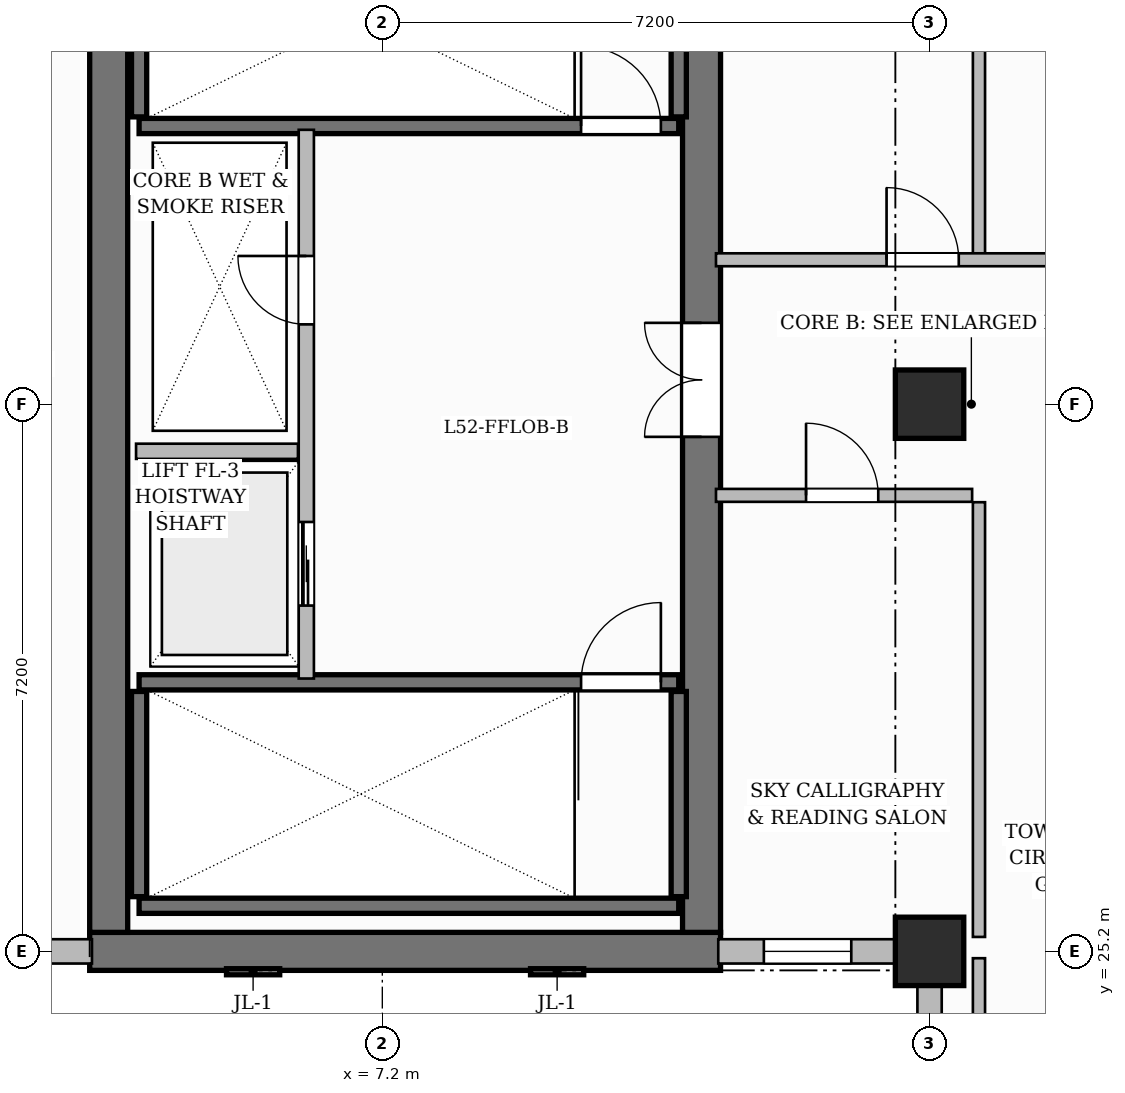
"""IFC4 building model, lengths in metres.
Left out: names, types, materials, properties, quantities, classifications, styles, units other than length and angle.
Written with IfcOpenShell. Run it as: python <this file> out.ifc"""

import sys

from ifc_helpers import new_model, si_unit, direction, frame, frame_2d, origin, origin_2d, place, context, subcontext, project, spatial, rectangle, extrude, source, transform, mapped, element, fill, save


model = new_model("IFC4")
c1 = context("Model", 3, precision=1e-05, world=origin(), true_north=direction((0.0, 1.0)))
c2 = subcontext(c1, "Body", "Model", "MODEL_VIEW")
j1 = project(units=[si_unit("LENGTHUNIT", "METRE"), si_unit("PLANEANGLEUNIT", "RADIAN")], contexts=[c1])
p1 = place(None, origin())
s1 = spatial("IfcSite", under=j1, at=p1, CompositionType="ELEMENT")
p2 = place(p1, origin())
s2 = spatial("IfcBuilding", under=s1, at=p2, CompositionType="ELEMENT")
p3 = place(p2, frame((0.0, 0.0, 209.6)))
s3 = spatial("IfcBuildingStorey", under=s2, at=p3, CompositionType="ELEMENT", Elevation=209.6)
p4 = place(p3, frame((3.35, 25.2, 0.0), z_axis=(0.0, 0.0, 1.0), x_axis=(1.0, 0.0, 0.0)))
e1 = element("IfcWall", 1, at=p4, inside=s3, PredefinedType="SHEAR", context=c2, shape_type="SweptSolid", body=[
    extrude(rectangle(XDim=8.3, YDim=0.5, at=frame_2d((4.15, 0.0))), origin(), (0.0, 0.0, 1.0), 3.85),
])
p5 = place(p3, frame((3.6, 25.45, 0.0), z_axis=(0.0, 0.0, 1.0), x_axis=(0.0, 1.0, 0.0)))
e2 = element("IfcWall", 2, at=p5, inside=s3, PredefinedType="SHEAR", context=c2, shape_type="SweptSolid", body=[
    extrude(rectangle(XDim=13.9, YDim=0.5, at=frame_2d((6.95, 0.0))), origin(), (0.0, 0.0, 1.0), 3.85),
])
p6 = place(p3, frame((11.4, 25.45, 0.0), z_axis=(0.0, 0.0, 1.0), x_axis=(0.0, 1.0, 0.0)))
e3 = element("IfcWall", 3, at=p6, inside=s3, PredefinedType="SHEAR", context=c2, shape_type="SweptSolid", body=[
    extrude(rectangle(XDim=13.9, YDim=0.5, at=frame_2d((6.95, 0.0))), origin(), (0.0, 0.0, 1.0), 3.85),
])
p7 = place(p6, frame((6.52, 0.0, 0.0)))
e4 = element("IfcOpeningElement", 4, at=p7, cuts=e3, PredefinedType="OPENING", context=c2, shape_type="SweptSolid", body=[
    extrude(rectangle(XDim=1.5, YDim=2.2, at=frame_2d((0.75, 1.1))), frame((0.0, 0.26, 0.0), z_axis=(0.0, -1.0, 0.0), x_axis=(1.0, 0.0, 0.0)), (0.0, 0.0, 1.0), 0.52),
])
m1 = source(origin(), c2, "Body", "SweptSolid", [
    extrude(rectangle(XDim=0.9, YDim=0.9, at=origin_2d()), origin(), (0.0, 0.0, 1.0), 3.85),
])
for number, where, z_axis, x_axis in (
    (5, (14.4, 25.2, 0.0), (0.0, 0.0, 1.0), (1.0, 0.0, 0.0)),
    (6, (14.4, 32.4, 0.0), (0.0, 0.0, 1.0), (1.0, 0.0, 0.0)),
):
    element("IfcColumn", number, at=place(p3, frame(where, z_axis=z_axis, x_axis=x_axis)), inside=s3, PredefinedType="COLUMN", context=c2, shape_type="MappedRepresentation", body=[
        mapped(m1, transform((0.0, 0.0, 0.0), scale=1.0)),
    ])
p8 = place(p3, frame((4.0, 25.8, 0.0), z_axis=(0.0, 0.0, 1.0), x_axis=(1.0, 0.0, 0.0)))
e7 = element("IfcWall", 7, at=p8, inside=s3, PredefinedType="SHEAR", context=c2, shape_type="SweptSolid", body=[
    extrude(rectangle(XDim=7.1, YDim=0.2, at=frame_2d((3.55, 0.0))), origin(), (0.0, 0.0, 1.0), 3.85),
])
for number, where, z_axis, x_axis in (
    (8, (4.0, 25.92, 0.0), (0.0, 0.0, 1.0), (0.0, 1.0, 0.0)),
    (9, (11.1, 25.92, 0.0), (0.0, 0.0, 1.0), (0.0, 1.0, 0.0)),
):
    element("IfcWall", number, at=place(p3, frame(where, z_axis=z_axis, x_axis=x_axis)), inside=s3, PredefinedType="SHEAR", context=c2, shape_type="SweptSolid", body=[
        extrude(rectangle(XDim=2.7, YDim=0.2, at=frame_2d((1.35, 0.0))), origin(), (0.0, 0.0, 1.0), 3.85),
    ])
p9 = place(p3, frame((4.0, 28.74, 0.0), z_axis=(0.0, 0.0, 1.0), x_axis=(1.0, 0.0, 0.0)))
e10 = element("IfcWall", 10, at=p9, inside=s3, PredefinedType="SHEAR", context=c2, shape_type="SweptSolid", body=[
    extrude(rectangle(XDim=7.1, YDim=0.2, at=frame_2d((3.55, 0.0))), origin(), (0.0, 0.0, 1.0), 3.85),
])
p10 = place(p9, frame((5.815, 0.0, 0.0)))
e11 = element("IfcOpeningElement", 11, at=p10, cuts=e10, PredefinedType="OPENING", context=c2, shape_type="SweptSolid", body=[
    extrude(rectangle(XDim=1.05, YDim=2.2, at=frame_2d((0.525, 1.1))), frame((0.0, 0.11, 0.0), z_axis=(0.0, -1.0, 0.0), x_axis=(1.0, 0.0, 0.0)), (0.0, 0.0, 1.0), 0.22),
])
for number, where, z_axis, x_axis in (
    (12, (4.0, 36.18, 0.0), (0.0, 0.0, 1.0), (0.0, 1.0, 0.0)),
    (13, (11.1, 36.18, 0.0), (0.0, 0.0, 1.0), (0.0, 1.0, 0.0)),
):
    element("IfcWall", number, at=place(p3, frame(where, z_axis=z_axis, x_axis=x_axis)), inside=s3, PredefinedType="SHEAR", context=c2, shape_type="SweptSolid", body=[
        extrude(rectangle(XDim=2.7, YDim=0.2, at=frame_2d((1.35, 0.0))), origin(), (0.0, 0.0, 1.0), 3.85),
    ])
p11 = place(p3, frame((4.0, 36.06, 0.0), z_axis=(0.0, 0.0, 1.0), x_axis=(1.0, 0.0, 0.0)))
e14 = element("IfcWall", 14, at=p11, inside=s3, PredefinedType="SHEAR", context=c2, shape_type="SweptSolid", body=[
    extrude(rectangle(XDim=7.1, YDim=0.2, at=frame_2d((3.55, 0.0))), origin(), (0.0, 0.0, 1.0), 3.85),
])
p12 = place(p11, frame((5.815, 0.0, 0.0)))
e15 = element("IfcOpeningElement", 15, at=p12, cuts=e14, PredefinedType="OPENING", context=c2, shape_type="SweptSolid", body=[
    extrude(rectangle(XDim=1.05, YDim=2.2, at=frame_2d((0.525, 1.1))), frame((0.0, 0.11, 0.0), z_axis=(0.0, -1.0, 0.0), x_axis=(1.0, 0.0, 0.0)), (0.0, 0.0, 1.0), 0.22),
])
p13 = place(p3, frame((6.2, 28.79, 0.0), z_axis=(0.0, 0.0, 1.0), x_axis=(0.0, 1.0, 0.0)))
e16 = element("IfcWall", 16, at=p13, inside=s3, PredefinedType="PARTITIONING", context=c2, shape_type="SweptSolid", body=[
    extrude(rectangle(XDim=7.22, YDim=0.2, at=frame_2d((3.61, 0.0))), origin(), (0.0, 0.0, 1.0), 3.6),
])
p14 = place(p13, frame((4.66, 0.0, 0.0)))
e17 = element("IfcOpeningElement", 17, at=p14, cuts=e16, PredefinedType="OPENING", context=c2, shape_type="SweptSolid", body=[
    extrude(rectangle(XDim=0.9, YDim=2.1, at=frame_2d((0.45, 1.05))), frame((0.0, 0.11, 0.0), z_axis=(0.0, -1.0, 0.0), x_axis=(1.0, 0.0, 0.0)), (0.0, 0.0, 1.0), 0.22),
])
p15 = place(p13, frame((0.96, 0.0, 0.0)))
e18 = element("IfcOpeningElement", 18, at=p15, cuts=e16, PredefinedType="OPENING", context=c2, shape_type="SweptSolid", body=[
    extrude(rectangle(XDim=1.1, YDim=2.2, at=frame_2d((0.55, 1.1))), frame((0.0, 0.11, 0.0), z_axis=(0.0, -1.0, 0.0), x_axis=(1.0, 0.0, 0.0)), (0.0, 0.0, 1.0), 0.22),
])
p16 = place(p3, frame((3.96, 31.78, 0.0), z_axis=(0.0, 0.0, 1.0), x_axis=(1.0, 0.0, 0.0)))
e19 = element("IfcWall", 19, at=p16, inside=s3, PredefinedType="PARTITIONING", context=c2, shape_type="SweptSolid", body=[
    extrude(rectangle(XDim=2.13, YDim=0.2, at=frame_2d((1.065, 0.0))), origin(), (0.0, 0.0, 1.0), 3.6),
])
p17 = place(p3, frame((15.05, 11.96, 0.0), z_axis=(0.0, 0.0, 1.0), x_axis=(0.0, 1.0, 0.0)))
e20 = element("IfcWall", 20, at=p17, inside=s3, PredefinedType="PARTITIONING", context=c2, shape_type="SweptSolid", body=[
    extrude(rectangle(XDim=13.15, YDim=0.16, at=frame_2d((6.575, 0.0))), origin(), (0.0, 0.0, 1.0), 3.6),
])
p18 = place(p3, frame((15.05, 34.34, 0.0), z_axis=(0.0, 0.0, 1.0), x_axis=(0.0, 1.0, 0.0)))
e21 = element("IfcWall", 21, at=p18, inside=s3, PredefinedType="PARTITIONING", context=c2, shape_type="SweptSolid", body=[
    extrude(rectangle(XDim=5.22, YDim=0.16, at=frame_2d((2.61, 0.0))), origin(), (0.0, 0.0, 1.0), 3.6),
])
p19 = place(p3, frame((15.05, 25.39, 0.0), z_axis=(0.0, 0.0, 1.0), x_axis=(0.0, 1.0, 0.0)))
e22 = element("IfcWall", 22, at=p19, inside=s3, PredefinedType="PARTITIONING", context=c2, shape_type="SweptSolid", body=[
    extrude(rectangle(XDim=5.72, YDim=0.16, at=frame_2d((2.86, 0.0))), origin(), (0.0, 0.0, 1.0), 3.6),
])
p20 = place(p3, frame((11.59, 31.2, 0.0), z_axis=(0.0, 0.0, 1.0), x_axis=(1.0, 0.0, 0.0)))
e23 = element("IfcWall", 23, at=p20, inside=s3, PredefinedType="PARTITIONING", context=c2, shape_type="SweptSolid", body=[
    extrude(rectangle(XDim=3.37, YDim=0.17, at=frame_2d((1.685, 0.0))), origin(), (0.0, 0.0, 1.0), 3.6),
])
p21 = place(p20, frame((1.185, 0.0, 0.0)))
e24 = element("IfcOpeningElement", 24, at=p21, cuts=e23, PredefinedType="OPENING", context=c2, shape_type="SweptSolid", body=[
    extrude(rectangle(XDim=0.95, YDim=2.15, at=frame_2d((0.475, 1.075))), frame((0.0, 0.095, 0.0), z_axis=(0.0, -1.0, 0.0), x_axis=(1.0, 0.0, 0.0)), (0.0, 0.0, 1.0), 0.19),
])
p22 = place(p3, frame((11.59, 34.3, 0.0), z_axis=(0.0, 0.0, 1.0), x_axis=(1.0, 0.0, 0.0)))
e25 = element("IfcWall", 25, at=p22, inside=s3, PredefinedType="PARTITIONING", context=c2, shape_type="SweptSolid", body=[
    extrude(rectangle(XDim=6.242, YDim=0.17, at=frame_2d((3.121, 0.0))), origin(), (0.0, 0.0, 1.0), 3.6),
])
p23 = place(p22, frame((2.244, 0.0, 0.0)))
e26 = element("IfcOpeningElement", 26, at=p23, cuts=e25, PredefinedType="OPENING", context=c2, shape_type="SweptSolid", body=[
    extrude(rectangle(XDim=0.95, YDim=2.15, at=frame_2d((0.475, 1.075))), frame((0.0, 0.095, 0.0), z_axis=(0.0, -1.0, 0.0), x_axis=(1.0, 0.0, 0.0)), (0.0, 0.0, 1.0), 0.19),
])
p24 = place(p3, frame((14.4, 0.05, 0.0), z_axis=(0.0, 0.0, 1.0), x_axis=(0.0, 1.0, 0.0)))
e27 = element("IfcWall", 27, at=p24, inside=s3, PredefinedType="SOLIDWALL", context=c2, shape_type="SweptSolid", body=[
    extrude(rectangle(XDim=25.1, YDim=0.32, at=frame_2d((12.55, 0.0))), origin(), (0.0, 0.0, 1.0), 3.085),
])
p25 = place(p24, frame((3.4, 0.0, 0.0)))
e28 = element("IfcOpeningElement", 28, at=p25, cuts=e27, PredefinedType="OPENING", context=c2, shape_type="SweptSolid", body=[
    extrude(rectangle(XDim=1.2, YDim=2.2, at=frame_2d((0.6, 1.1))), frame((0.0, 0.17, 0.0), z_axis=(0.0, -1.0, 0.0), x_axis=(1.0, 0.0, 0.0)), (0.0, 0.0, 1.0), 0.34),
])
p26 = place(p24, frame((1.225, 0.0, 0.8)))
e29 = element("IfcOpeningElement", 29, at=p26, cuts=e27, PredefinedType="OPENING", context=c2, shape_type="SweptSolid", body=[
    extrude(rectangle(XDim=1.4, YDim=1.85, at=frame_2d((0.7, 0.925))), frame((0.0, 0.17, 0.0), z_axis=(0.0, -1.0, 0.0), x_axis=(1.0, 0.0, 0.0)), (0.0, 0.0, 1.0), 0.34),
])
p27 = place(p24, frame((5.154, 0.0, 0.8)))
e30 = element("IfcOpeningElement", 30, at=p27, cuts=e27, PredefinedType="OPENING", context=c2, shape_type="SweptSolid", body=[
    extrude(rectangle(XDim=0.95, YDim=1.75, at=frame_2d((0.475, 0.875))), frame((0.0, 0.17, 0.0), z_axis=(0.0, -1.0, 0.0), x_axis=(1.0, 0.0, 0.0)), (0.0, 0.0, 1.0), 0.34),
])
p28 = place(p24, frame((8.346, 0.0, 0.8)))
e31 = element("IfcOpeningElement", 31, at=p28, cuts=e27, PredefinedType="OPENING", context=c2, shape_type="SweptSolid", body=[
    extrude(rectangle(XDim=1.15, YDim=1.8, at=frame_2d((0.575, 0.9))), frame((0.0, 0.17, 0.0), z_axis=(0.0, -1.0, 0.0), x_axis=(1.0, 0.0, 0.0)), (0.0, 0.0, 1.0), 0.34),
])
p29 = place(p24, frame((10.285, 0.0, 0.8)))
e32 = element("IfcOpeningElement", 32, at=p29, cuts=e27, PredefinedType="OPENING", context=c2, shape_type="SweptSolid", body=[
    extrude(rectangle(XDim=1.15, YDim=1.8, at=frame_2d((0.575, 0.9))), frame((0.0, 0.17, 0.0), z_axis=(0.0, -1.0, 0.0), x_axis=(1.0, 0.0, 0.0)), (0.0, 0.0, 1.0), 0.34),
])
p30 = place(p24, frame((12.114, 0.0, 0.8)))
e33 = element("IfcOpeningElement", 33, at=p30, cuts=e27, PredefinedType="OPENING", context=c2, shape_type="SweptSolid", body=[
    extrude(rectangle(XDim=1.15, YDim=1.8, at=frame_2d((0.575, 0.9))), frame((0.0, 0.17, 0.0), z_axis=(0.0, -1.0, 0.0), x_axis=(1.0, 0.0, 0.0)), (0.0, 0.0, 1.0), 0.34),
])
p31 = place(p24, frame((15.675, 0.0, 0.8)))
e34 = element("IfcOpeningElement", 34, at=p31, cuts=e27, PredefinedType="OPENING", context=c2, shape_type="SweptSolid", body=[
    extrude(rectangle(XDim=1.8, YDim=1.85, at=frame_2d((0.9, 0.925))), frame((0.0, 0.17, 0.0), z_axis=(0.0, -1.0, 0.0), x_axis=(1.0, 0.0, 0.0)), (0.0, 0.0, 1.0), 0.34),
])
p32 = place(p24, frame((18.425, 0.0, 0.8)))
e35 = element("IfcOpeningElement", 35, at=p32, cuts=e27, PredefinedType="OPENING", context=c2, shape_type="SweptSolid", body=[
    extrude(rectangle(XDim=1.8, YDim=1.85, at=frame_2d((0.9, 0.925))), frame((0.0, 0.17, 0.0), z_axis=(0.0, -1.0, 0.0), x_axis=(1.0, 0.0, 0.0)), (0.0, 0.0, 1.0), 0.34),
])
p33 = place(p24, frame((22.65, 0.0, 0.8)))
e36 = element("IfcOpeningElement", 36, at=p33, cuts=e27, PredefinedType="OPENING", context=c2, shape_type="SweptSolid", body=[
    extrude(rectangle(XDim=1.4, YDim=1.85, at=frame_2d((0.7, 0.925))), frame((0.0, 0.17, 0.0), z_axis=(0.0, -1.0, 0.0), x_axis=(1.0, 0.0, 0.0)), (0.0, 0.0, 1.0), 0.34),
])
p34 = place(p3, frame((11.62, 25.2, 0.0), z_axis=(0.0, 0.0, 1.0), x_axis=(1.0, 0.0, 0.0)))
e37 = element("IfcWall", 37, at=p34, inside=s3, PredefinedType="SOLIDWALL", context=c2, shape_type="SweptSolid", body=[
    extrude(rectangle(XDim=2.78, YDim=0.32, at=frame_2d((1.39, 0.0))), origin(), (0.0, 0.0, 1.0), 2.835),
])
p35 = place(p34, frame((0.6, 0.0, 0.8)))
e38 = element("IfcOpeningElement", 38, at=p35, cuts=e37, PredefinedType="OPENING", context=c2, shape_type="SweptSolid", body=[
    extrude(rectangle(XDim=1.15, YDim=1.8, at=frame_2d((0.575, 0.9))), frame((0.0, 0.17, 0.0), z_axis=(0.0, -1.0, 0.0), x_axis=(1.0, 0.0, 0.0)), (0.0, 0.0, 1.0), 0.34),
])
p36 = place(p3, frame((0.0, 25.2, 0.0), z_axis=(0.0, 0.0, 1.0), x_axis=(1.0, 0.0, 0.0)))
e39 = element("IfcWall", 39, at=p36, inside=s3, PredefinedType="SOLIDWALL", context=c2, shape_type="SweptSolid", body=[
    extrude(rectangle(XDim=3.38, YDim=0.32, at=frame_2d((1.69, 0.0))), origin(), (0.0, 0.0, 1.0), 2.835),
])
p37 = place(p36, frame((1.205, 0.0, 0.8)))
e40 = element("IfcOpeningElement", 40, at=p37, cuts=e39, PredefinedType="OPENING", context=c2, shape_type="SweptSolid", body=[
    extrude(rectangle(XDim=1.4, YDim=1.85, at=frame_2d((0.7, 0.925))), frame((0.0, 0.17, 0.0), z_axis=(0.0, -1.0, 0.0), x_axis=(1.0, 0.0, 0.0)), (0.0, 0.0, 1.0), 0.34),
])
m2 = source(origin(), c2, "Body", "SweptSolid", [
    extrude(rectangle(XDim=1.05, YDim=2.2, at=frame_2d((0.525, 1.1))), frame((0.0, 0.025, 0.0), z_axis=(0.0, -1.0, 0.0), x_axis=(1.0, 0.0, 0.0)), (0.0, 0.0, 1.0), 0.05),
])
p38 = place(p10, origin())
e41 = element("IfcDoor", 41, at=p38, inside=s3, OperationType="SINGLE_SWING_RIGHT", PredefinedType="DOOR", context=c2, shape_type="MappedRepresentation", body=[
    mapped(m2, transform((0.0, 0.0, 0.0), scale=1.0)),
])
fill(e11, e41)
p39 = place(p12, origin())
e42 = element("IfcDoor", 42, at=p39, inside=s3, OperationType="SINGLE_SWING_LEFT", PredefinedType="DOOR", context=c2, shape_type="MappedRepresentation", body=[
    mapped(m2, transform((0.0, 0.0, 0.0), scale=1.0)),
])
fill(e15, e42)
m3 = source(origin(), c2, "Body", "SweptSolid", [
    extrude(rectangle(XDim=0.9, YDim=2.1, at=frame_2d((0.45, 1.05))), frame((0.0, 0.025, 0.0), z_axis=(0.0, -1.0, 0.0), x_axis=(1.0, 0.0, 0.0)), (0.0, 0.0, 1.0), 0.05),
])
p40 = place(p14, origin())
e43 = element("IfcDoor", 43, at=p40, inside=s3, OperationType="SINGLE_SWING_RIGHT", PredefinedType="DOOR", context=c2, shape_type="MappedRepresentation", body=[
    mapped(m3, transform((0.0, 0.0, 0.0), scale=1.0)),
])
fill(e17, e43)
m4 = source(origin(), c2, "Body", "SweptSolid", [
    extrude(rectangle(XDim=1.5, YDim=2.2, at=frame_2d((0.75, 1.1))), frame((0.0, 0.025, 0.0), z_axis=(0.0, -1.0, 0.0), x_axis=(1.0, 0.0, 0.0)), (0.0, 0.0, 1.0), 0.05),
])
p41 = place(p7, origin())
e44 = element("IfcDoor", 44, at=p41, inside=s3, OperationType="DOUBLE_DOOR_SINGLE_SWING", PredefinedType="DOOR", context=c2, shape_type="MappedRepresentation", body=[
    mapped(m4, transform((0.0, 0.0, 0.0), scale=1.0)),
])
fill(e4, e44)
m5 = source(origin(), c2, "Body", "SweptSolid", [
    extrude(rectangle(XDim=0.95, YDim=2.15, at=frame_2d((0.475, 1.075))), frame((0.0, 0.025, 0.0), z_axis=(0.0, -1.0, 0.0), x_axis=(1.0, 0.0, 0.0)), (0.0, 0.0, 1.0), 0.05),
])
p42 = place(p21, origin())
e45 = element("IfcDoor", 45, at=p42, inside=s3, OperationType="SINGLE_SWING_LEFT", PredefinedType="DOOR", context=c2, shape_type="MappedRepresentation", body=[
    mapped(m5, transform((0.0, 0.0, 0.0), scale=1.0)),
])
fill(e24, e45)
p43 = place(p23, origin())
e46 = element("IfcDoor", 46, at=p43, inside=s3, OperationType="SINGLE_SWING_LEFT", PredefinedType="DOOR", context=c2, shape_type="MappedRepresentation", body=[
    mapped(m5, transform((0.0, 0.0, 0.0), scale=1.0)),
])
fill(e26, e46)
m6 = source(origin(), c2, "Body", "SweptSolid", [
    extrude(rectangle(XDim=1.1, YDim=2.2, at=frame_2d((0.55, 1.1))), frame((0.0, 0.025, 0.0), z_axis=(0.0, -1.0, 0.0), x_axis=(1.0, 0.0, 0.0)), (0.0, 0.0, 1.0), 0.05),
])
p44 = place(p15, origin())
e47 = element("IfcDoor", 47, at=p44, inside=s3, OperationType="SLIDING_TO_LEFT", PredefinedType="DOOR", context=c2, shape_type="MappedRepresentation", body=[
    mapped(m6, transform((0.0, 0.0, 0.0), scale=1.0)),
])
fill(e18, e47)
m7 = source(origin(), c2, "Body", "SweptSolid", [
    extrude(rectangle(XDim=1.15, YDim=1.8, at=frame_2d((0.575, 0.9))), frame((0.0, 0.03, 0.0), z_axis=(0.0, -1.0, 0.0), x_axis=(1.0, 0.0, 0.0)), (0.0, 0.0, 1.0), 0.06),
])
p45 = place(p35, origin())
e48 = element("IfcWindow", 48, at=p45, inside=s3, PartitioningType="SINGLE_PANEL", PredefinedType="WINDOW", context=c2, shape_type="MappedRepresentation", body=[
    mapped(m7, transform((0.0, 0.0, 0.0), scale=1.0)),
])
fill(e38, e48)
save(model, sys.argv[1])
